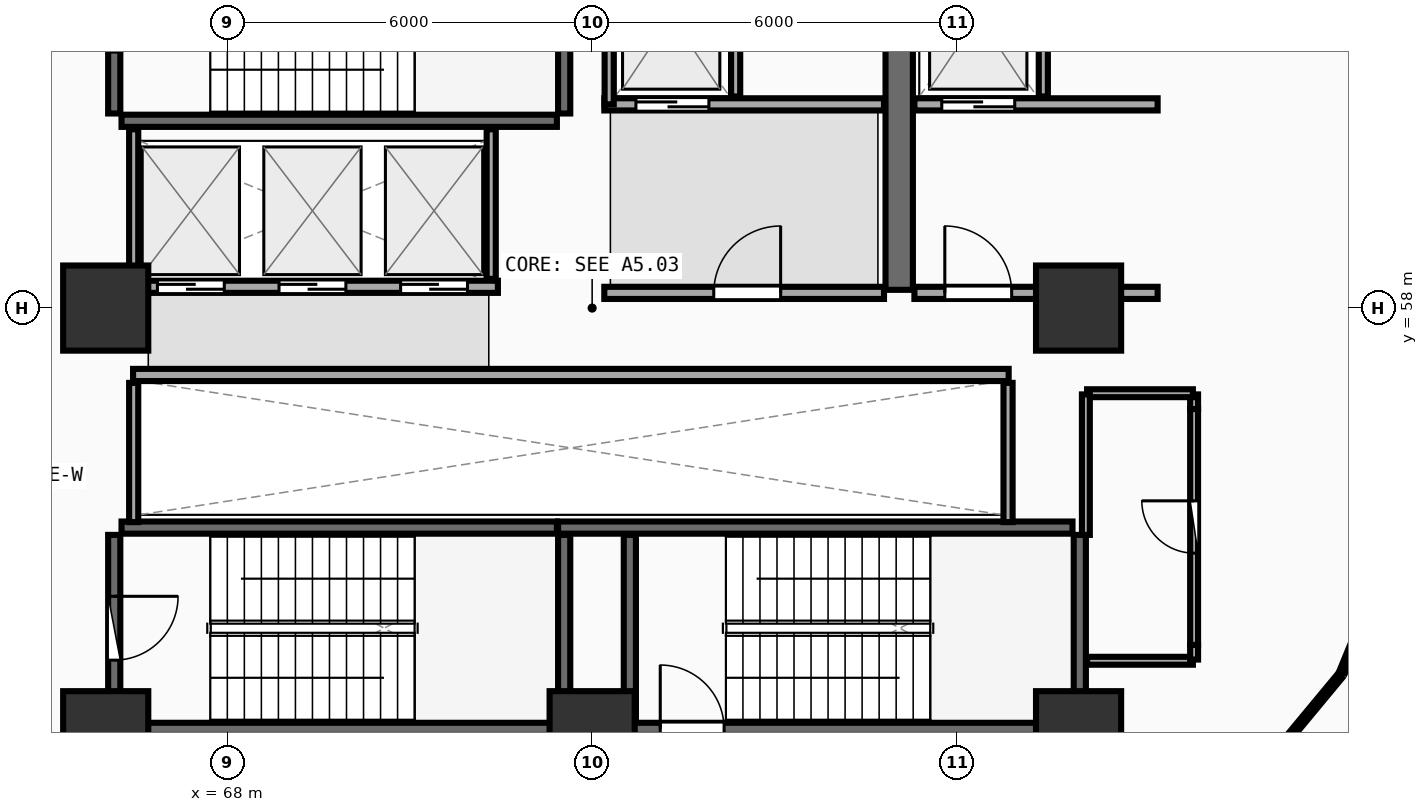
"""IFC4 building model, lengths in metres.
Left out: names, types, materials, properties, quantities, classifications, styles, units other than length and angle.
Written with IfcOpenShell. Run it as: python <this file> out.ifc"""

import sys

from ifc_helpers import new_model, si_unit, direction, frame, frame_2d, origin, origin_2d, place, context, subcontext, project, spatial, rectangle, extrude, element, fill, save


model = new_model("IFC4")
c1 = context("Model", 3, precision=1e-05, world=origin(), true_north=direction((0.0, 1.0)))
c2 = subcontext(c1, "Body", "Model", "MODEL_VIEW")
j1 = project(units=[si_unit("LENGTHUNIT", "METRE"), si_unit("PLANEANGLEUNIT", "RADIAN")], contexts=[c1])
p1 = place(None, origin())
s1 = spatial("IfcSite", under=j1, at=p1, CompositionType="ELEMENT")
p2 = place(p1, origin())
s2 = spatial("IfcBuilding", under=s1, at=p2, CompositionType="ELEMENT")
p3 = place(p2, frame((0.0, 0.0, 4.5)))
s3 = spatial("IfcBuildingStorey", under=s2, at=p3, CompositionType="ELEMENT", Elevation=4.5)
for number, where, z_axis, x_axis in (
    (1, (66.0, 51.0, 0.0), (0.0, 0.0, 1.0), (1.0, 0.0, 0.0)),
    (2, (74.0, 51.0, 0.0), (0.0, 0.0, 1.0), (1.0, 0.0, 0.0)),
    (3, (82.0, 51.0, 0.0), (0.0, 0.0, 1.0), (1.0, 0.0, 0.0)),
    (4, (82.0, 58.0, 0.0), (0.0, 0.0, 1.0), (1.0, 0.0, 0.0)),
    (5, (66.0, 58.0, 0.0), (0.0, 0.0, 1.0), (1.0, 0.0, 0.0)),
):
    element("IfcColumn", number, at=place(p3, frame(where, z_axis=z_axis, x_axis=x_axis)), inside=s3, PredefinedType="PILASTER", context=c2, shape_type="SweptSolid", body=[
        extrude(rectangle(XDim=1.4, YDim=1.4, at=origin_2d()), origin(), (0.0, 0.0, 1.0), 4.5),
    ])
p4 = place(p3, frame((66.26, 61.08, 0.0), z_axis=(0.0, 0.0, 1.0), x_axis=(1.0, 0.0, 0.0)))
e6 = element("IfcWall", 6, at=p4, inside=s3, PredefinedType="SHEAR", context=c2, shape_type="SweptSolid", body=[
    extrude(rectangle(XDim=7.16, YDim=0.2, at=frame_2d((3.58, 0.0))), origin(), (0.0, 0.0, 1.0), 4.2),
])
p5 = place(p3, frame((73.54, 61.2, 0.0), z_axis=(0.0, 0.0, 1.0), x_axis=(0.0, 1.0, 0.0)))
e7 = element("IfcWall", 7, at=p5, inside=s3, PredefinedType="SHEAR", context=c2, shape_type="SweptSolid", body=[
    extrude(rectangle(XDim=3.07, YDim=0.2, at=frame_2d((1.535, 0.0))), origin(), (0.0, 0.0, 1.0), 4.2),
])
p6 = place(p3, frame((66.14, 64.27, 0.0), z_axis=(0.0, 0.0, 1.0), x_axis=(0.0, -1.0, 0.0)))
e8 = element("IfcWall", 8, at=p6, inside=s3, PredefinedType="SHEAR", context=c2, shape_type="SweptSolid", body=[
    extrude(rectangle(XDim=3.07, YDim=0.2, at=frame_2d((1.535, 0.0))), origin(), (0.0, 0.0, 1.0), 4.2),
])
p7 = place(p6, frame((1.01, 0.0, 0.0)))
e9 = element("IfcOpeningElement", 9, at=p7, cuts=e8, PredefinedType="OPENING", context=c2, shape_type="SweptSolid", body=[
    extrude(rectangle(XDim=1.05, YDim=2.1, at=frame_2d((0.525, 1.05))), frame((0.0, 0.11, 0.0), z_axis=(0.0, -1.0, 0.0), x_axis=(1.0, 0.0, 0.0)), (0.0, 0.0, 1.0), 0.22),
])
p8 = place(p3, frame((74.0, 51.08, 0.0), z_axis=(0.0, 0.0, 1.0), x_axis=(1.0, 0.0, 0.0)))
e10 = element("IfcWall", 10, at=p8, inside=s3, PredefinedType="SHEAR", context=c2, shape_type="SweptSolid", body=[
    extrude(rectangle(XDim=7.9, YDim=0.2, at=frame_2d((3.95, 0.0))), origin(), (0.0, 0.0, 1.0), 4.2),
])
p9 = place(p8, frame((1.12, 0.0, 0.0)))
e11 = element("IfcOpeningElement", 11, at=p9, cuts=e10, PredefinedType="OPENING", context=c2, shape_type="SweptSolid", body=[
    extrude(rectangle(XDim=1.05, YDim=2.1, at=frame_2d((0.525, 1.05))), frame((0.0, 0.11, 0.0), z_axis=(0.0, -1.0, 0.0), x_axis=(1.0, 0.0, 0.0)), (0.0, 0.0, 1.0), 0.22),
])
p10 = place(p3, frame((82.02, 51.2, 0.0), z_axis=(0.0, 0.0, 1.0), x_axis=(0.0, 1.0, 0.0)))
e12 = element("IfcWall", 12, at=p10, inside=s3, PredefinedType="SHEAR", context=c2, shape_type="SweptSolid", body=[
    extrude(rectangle(XDim=3.07, YDim=0.2, at=frame_2d((1.535, 0.0))), origin(), (0.0, 0.0, 1.0), 4.2),
])
p11 = place(p3, frame((81.9, 54.39, 0.0), z_axis=(0.0, 0.0, 1.0), x_axis=(-1.0, 0.0, 0.0)))
e13 = element("IfcWall", 13, at=p11, inside=s3, PredefinedType="SHEAR", context=c2, shape_type="SweptSolid", body=[
    extrude(rectangle(XDim=8.46, YDim=0.2, at=frame_2d((4.23, 0.0))), origin(), (0.0, 0.0, 1.0), 4.2),
])
p12 = place(p3, frame((74.62, 54.27, 0.0), z_axis=(0.0, 0.0, 1.0), x_axis=(0.0, -1.0, 0.0)))
e14 = element("IfcWall", 14, at=p12, inside=s3, PredefinedType="SHEAR", context=c2, shape_type="SweptSolid", body=[
    extrude(rectangle(XDim=3.07, YDim=0.2, at=frame_2d((1.535, 0.0))), origin(), (0.0, 0.0, 1.0), 4.2),
])
p13 = place(p3, frame((66.26, 51.08, 0.0), z_axis=(0.0, 0.0, 1.0), x_axis=(1.0, 0.0, 0.0)))
e15 = element("IfcWall", 15, at=p13, inside=s3, PredefinedType="SHEAR", context=c2, shape_type="SweptSolid", body=[
    extrude(rectangle(XDim=7.16, YDim=0.2, at=frame_2d((3.58, 0.0))), origin(), (0.0, 0.0, 1.0), 4.2),
])
p14 = place(p3, frame((73.54, 51.2, 0.0), z_axis=(0.0, 0.0, 1.0), x_axis=(0.0, 1.0, 0.0)))
e16 = element("IfcWall", 16, at=p14, inside=s3, PredefinedType="SHEAR", context=c2, shape_type="SweptSolid", body=[
    extrude(rectangle(XDim=3.07, YDim=0.2, at=frame_2d((1.535, 0.0))), origin(), (0.0, 0.0, 1.0), 4.2),
])
p15 = place(p3, frame((73.42, 54.39, 0.0), z_axis=(0.0, 0.0, 1.0), x_axis=(-1.0, 0.0, 0.0)))
e17 = element("IfcWall", 17, at=p15, inside=s3, PredefinedType="SHEAR", context=c2, shape_type="SweptSolid", body=[
    extrude(rectangle(XDim=7.16, YDim=0.2, at=frame_2d((3.58, 0.0))), origin(), (0.0, 0.0, 1.0), 4.2),
])
p16 = place(p3, frame((66.14, 54.27, 0.0), z_axis=(0.0, 0.0, 1.0), x_axis=(0.0, -1.0, 0.0)))
e18 = element("IfcWall", 18, at=p16, inside=s3, PredefinedType="SHEAR", context=c2, shape_type="SweptSolid", body=[
    extrude(rectangle(XDim=3.07, YDim=0.2, at=frame_2d((1.535, 0.0))), origin(), (0.0, 0.0, 1.0), 4.2),
])
p17 = place(p16, frame((1.01, 0.0, 0.0)))
e19 = element("IfcOpeningElement", 19, at=p17, cuts=e18, PredefinedType="OPENING", context=c2, shape_type="SweptSolid", body=[
    extrude(rectangle(XDim=1.05, YDim=2.1, at=frame_2d((0.525, 1.05))), frame((0.0, 0.11, 0.0), z_axis=(0.0, -1.0, 0.0), x_axis=(1.0, 0.0, 0.0)), (0.0, 0.0, 1.0), 0.22),
])
p18 = place(p3, frame((79.05, 58.3, 0.0), z_axis=(0.0, 0.0, 1.0), x_axis=(0.0, 1.0, 0.0)))
e20 = element("IfcWall", 20, at=p18, inside=s3, PredefinedType="SHEAR", context=c2, shape_type="SweptSolid", body=[
    extrude(rectangle(XDim=6.3, YDim=0.45, at=frame_2d((3.15, 0.0))), origin(), (0.0, 0.0, 1.0), 4.2),
])
p19 = place(p3, frame((74.2, 61.35, 0.0), z_axis=(0.0, 0.0, 1.0), x_axis=(1.0, 0.0, 0.0)))
e21 = element("IfcWall", 21, at=p19, inside=s3, PredefinedType="SOLIDWALL", context=c2, shape_type="SweptSolid", body=[
    extrude(rectangle(XDim=4.6, YDim=0.2, at=frame_2d((2.3, 0.0))), origin(), (0.0, 0.0, 1.0), 4.19),
])
p20 = place(p19, frame((0.52, 0.0, 0.0)))
e22 = element("IfcOpeningElement", 22, at=p20, cuts=e21, PredefinedType="OPENING", context=c2, shape_type="SweptSolid", body=[
    extrude(rectangle(XDim=1.2, YDim=2.15, at=frame_2d((0.6, 1.075))), frame((0.0, 0.11, 0.0), z_axis=(0.0, -1.0, 0.0), x_axis=(1.0, 0.0, 0.0)), (0.0, 0.0, 1.0), 0.22),
])
p21 = place(p3, frame((74.28, 61.35, 0.0), z_axis=(0.0, 0.0, 1.0), x_axis=(0.0, 1.0, 0.0)))
e23 = element("IfcWall", 23, at=p21, inside=s3, PredefinedType="PARTITIONING", context=c2, shape_type="SweptSolid", body=[
    extrude(rectangle(XDim=2.97, YDim=0.15, at=frame_2d((1.485, 0.0))), origin(), (0.0, 0.0, 1.0), 4.19),
])
p22 = place(p3, frame((76.36, 61.48, 0.0), z_axis=(0.0, 0.0, 1.0), x_axis=(0.0, 1.0, 0.0)))
e24 = element("IfcWall", 24, at=p22, inside=s3, PredefinedType="PARTITIONING", context=c2, shape_type="SweptSolid", body=[
    extrude(rectangle(XDim=2.84, YDim=0.15, at=frame_2d((1.42, 0.0))), origin(), (0.0, 0.0, 1.0), 4.19),
])
p23 = place(p3, frame((79.3, 61.35, 0.0), z_axis=(0.0, 0.0, 1.0), x_axis=(1.0, 0.0, 0.0)))
e25 = element("IfcWall", 25, at=p23, inside=s3, PredefinedType="SOLIDWALL", context=c2, shape_type="SweptSolid", body=[
    extrude(rectangle(XDim=4.0, YDim=0.2, at=frame_2d((2.0, 0.0))), origin(), (0.0, 0.0, 1.0), 3.485),
])
p24 = place(p23, frame((0.45, 0.0, 0.0)))
e26 = element("IfcOpeningElement", 26, at=p24, cuts=e25, PredefinedType="OPENING", context=c2, shape_type="SweptSolid", body=[
    extrude(rectangle(XDim=1.2, YDim=2.15, at=frame_2d((0.6, 1.075))), frame((0.0, 0.11, 0.0), z_axis=(0.0, -1.0, 0.0), x_axis=(1.0, 0.0, 0.0)), (0.0, 0.0, 1.0), 0.22),
])
p25 = place(p3, frame((81.42, 61.48, 0.0), z_axis=(0.0, 0.0, 1.0), x_axis=(0.0, 1.0, 0.0)))
e27 = element("IfcWall", 27, at=p25, inside=s3, PredefinedType="PARTITIONING", context=c2, shape_type="SweptSolid", body=[
    extrude(rectangle(XDim=2.84, YDim=0.15, at=frame_2d((1.42, 0.0))), origin(), (0.0, 0.0, 1.0), 4.19),
])
p26 = place(p3, frame((74.2, 58.25, 0.0), z_axis=(0.0, 0.0, 1.0), x_axis=(1.0, 0.0, 0.0)))
e28 = element("IfcWall", 28, at=p26, inside=s3, PredefinedType="SOLIDWALL", context=c2, shape_type="SweptSolid", body=[
    extrude(rectangle(XDim=4.6, YDim=0.2, at=frame_2d((2.3, 0.0))), origin(), (0.0, 0.0, 1.0), 4.19),
])
p27 = place(p26, frame((1.8, 0.0, 0.0)))
e29 = element("IfcOpeningElement", 29, at=p27, cuts=e28, PredefinedType="OPENING", context=c2, shape_type="SweptSolid", body=[
    extrude(rectangle(XDim=1.1, YDim=2.1, at=frame_2d((0.55, 1.05))), frame((0.0, 0.11, 0.0), z_axis=(0.0, -1.0, 0.0), x_axis=(1.0, 0.0, 0.0)), (0.0, 0.0, 1.0), 0.22),
])
p28 = place(p3, frame((79.3, 58.25, 0.0), z_axis=(0.0, 0.0, 1.0), x_axis=(1.0, 0.0, 0.0)))
e30 = element("IfcWall", 30, at=p28, inside=s3, PredefinedType="SOLIDWALL", context=c2, shape_type="SweptSolid", body=[
    extrude(rectangle(XDim=4.0, YDim=0.2, at=frame_2d((2.0, 0.0))), origin(), (0.0, 0.0, 1.0), 3.485),
])
p29 = place(p28, frame((0.5, 0.0, 0.0)))
e31 = element("IfcOpeningElement", 31, at=p29, cuts=e30, PredefinedType="OPENING", context=c2, shape_type="SweptSolid", body=[
    extrude(rectangle(XDim=1.1, YDim=2.1, at=frame_2d((0.55, 1.05))), frame((0.0, 0.11, 0.0), z_axis=(0.0, -1.0, 0.0), x_axis=(1.0, 0.0, 0.0)), (0.0, 0.0, 1.0), 0.22),
])
p30 = place(p3, frame((66.45, 58.35, 0.0), z_axis=(0.0, 0.0, 1.0), x_axis=(1.0, 0.0, 0.0)))
e32 = element("IfcWall", 32, at=p30, inside=s3, PredefinedType="SOLIDWALL", context=c2, shape_type="SweptSolid", body=[
    extrude(rectangle(XDim=6.0, YDim=0.2, at=frame_2d((3.0, 0.0))), origin(), (0.0, 0.0, 1.0), 4.19),
])
p31 = place(p30, frame((0.4, 0.0, 0.0)))
e33 = element("IfcOpeningElement", 33, at=p31, cuts=e32, PredefinedType="OPENING", context=c2, shape_type="SweptSolid", body=[
    extrude(rectangle(XDim=1.1, YDim=2.1, at=frame_2d((0.55, 1.05))), frame((0.0, 0.11, 0.0), z_axis=(0.0, -1.0, 0.0), x_axis=(1.0, 0.0, 0.0)), (0.0, 0.0, 1.0), 0.22),
])
p32 = place(p30, frame((2.4, 0.0, 0.0)))
e34 = element("IfcOpeningElement", 34, at=p32, cuts=e32, PredefinedType="OPENING", context=c2, shape_type="SweptSolid", body=[
    extrude(rectangle(XDim=1.1, YDim=2.1, at=frame_2d((0.55, 1.05))), frame((0.0, 0.11, 0.0), z_axis=(0.0, -1.0, 0.0), x_axis=(1.0, 0.0, 0.0)), (0.0, 0.0, 1.0), 0.22),
])
p33 = place(p30, frame((4.4, 0.0, 0.0)))
e35 = element("IfcOpeningElement", 35, at=p33, cuts=e32, PredefinedType="OPENING", context=c2, shape_type="SweptSolid", body=[
    extrude(rectangle(XDim=1.1, YDim=2.1, at=frame_2d((0.55, 1.05))), frame((0.0, 0.11, 0.0), z_axis=(0.0, -1.0, 0.0), x_axis=(1.0, 0.0, 0.0)), (0.0, 0.0, 1.0), 0.22),
])
for number, where, z_axis, x_axis in (
    (36, (66.46, 58.48, 0.0), (0.0, 0.0, 1.0), (0.0, 1.0, 0.0)),
    (37, (72.34, 58.48, 0.0), (0.0, 0.0, 1.0), (0.0, 1.0, 0.0)),
):
    element("IfcWall", number, at=place(p3, frame(where, z_axis=z_axis, x_axis=x_axis)), inside=s3, PredefinedType="PARTITIONING", context=c2, shape_type="SweptSolid", body=[
        extrude(rectangle(XDim=2.46, YDim=0.15, at=frame_2d((1.23, 0.0))), origin(), (0.0, 0.0, 1.0), 4.19),
    ])
p34 = place(p3, frame((66.45, 56.9, 0.0), z_axis=(0.0, 0.0, 1.0), x_axis=(1.0, 0.0, 0.0)))
e38 = element("IfcWall", 38, at=p34, inside=s3, PredefinedType="SOLIDWALL", context=c2, shape_type="SweptSolid", body=[
    extrude(rectangle(XDim=14.4, YDim=0.2, at=frame_2d((7.2, 0.0))), origin(), (0.0, 0.0, 1.0), 4.19),
])
for number, where, z_axis, x_axis in (
    (39, (66.46, 54.48, 0.0), (0.0, 0.0, 1.0), (0.0, 1.0, 0.0)),
    (40, (80.84, 54.48, 0.0), (0.0, 0.0, 1.0), (0.0, 1.0, 0.0)),
):
    element("IfcWall", number, at=place(p3, frame(where, z_axis=z_axis, x_axis=x_axis)), inside=s3, PredefinedType="PARTITIONING", context=c2, shape_type="SweptSolid", body=[
        extrude(rectangle(XDim=2.29, YDim=0.15, at=frame_2d((1.145, 0.0))), origin(), (0.0, 0.0, 1.0), 4.19),
    ])
p35 = place(p3, frame((83.9, 52.46, 0.0), z_axis=(0.0, 0.0, 1.0), x_axis=(0.0, 1.0, 0.0)))
e41 = element("IfcWall", 41, at=p35, inside=s3, PredefinedType="PLUMBINGWALL", context=c2, shape_type="SweptSolid", body=[
    extrude(rectangle(XDim=3.88, YDim=0.13, at=frame_2d((1.94, 0.0))), origin(), (0.0, 0.0, 1.0), 4.19),
])
p36 = place(p35, frame((1.51, 0.0, 0.0)))
e42 = element("IfcOpeningElement", 42, at=p36, cuts=e41, PredefinedType="OPENING", context=c2, shape_type="SweptSolid", body=[
    extrude(rectangle(XDim=0.86, YDim=2.05, at=frame_2d((0.43, 1.025))), frame((0.0, 0.075, 0.0), z_axis=(0.0, -1.0, 0.0), x_axis=(1.0, 0.0, 0.0)), (0.0, 0.0, 1.0), 0.15),
])
p37 = place(p3, frame((82.14, 52.2, 0.0), z_axis=(0.0, 0.0, 1.0), x_axis=(1.0, 0.0, 0.0)))
e43 = element("IfcWall", 43, at=p37, inside=s3, PredefinedType="PLUMBINGWALL", context=c2, shape_type="SweptSolid", body=[
    extrude(rectangle(XDim=1.74, YDim=0.13, at=frame_2d((0.87, 0.0))), origin(), (0.0, 0.0, 1.0), 3.485),
])
for number, where, z_axis, x_axis in (
    (44, (83.9, 52.22, 0.0), (0.0, 0.0, 1.0), (0.0, 1.0, 0.0)),
    (45, (83.9, 56.34, 0.0), (0.0, 0.0, 1.0), (0.0, 1.0, 0.0)),
):
    element("IfcWall", number, at=place(p3, frame(where, z_axis=z_axis, x_axis=x_axis)), inside=s3, PredefinedType="PLUMBINGWALL", context=c2, shape_type="SweptSolid", body=[
        extrude(rectangle(XDim=0.24, YDim=0.13, at=frame_2d((0.12, 0.0))), origin(), (0.0, 0.0, 1.0), 4.19),
    ])
p38 = place(p3, frame((83.88, 56.6, 0.0), z_axis=(0.0, 0.0, 1.0), x_axis=(-1.0, 0.0, 0.0)))
e46 = element("IfcWall", 46, at=p38, inside=s3, PredefinedType="PLUMBINGWALL", context=c2, shape_type="SweptSolid", body=[
    extrude(rectangle(XDim=1.74, YDim=0.13, at=frame_2d((0.87, 0.0))), origin(), (0.0, 0.0, 1.0), 3.485),
])
p39 = place(p3, frame((82.12, 56.58, 0.0), z_axis=(0.0, 0.0, 1.0), x_axis=(0.0, -1.0, 0.0)))
e47 = element("IfcWall", 47, at=p39, inside=s3, PredefinedType="PLUMBINGWALL", context=c2, shape_type="SweptSolid", body=[
    extrude(rectangle(XDim=2.31, YDim=0.13, at=frame_2d((1.155, 0.0))), origin(), (0.0, 0.0, 1.0), 3.485),
])
p40 = place(p3, frame((83.939, 49.107, 0.0), z_axis=(0.0, 0.0, 1.0), x_axis=(0.638393231466, 0.769710388405, 0.0)))
e48 = element("IfcWall", 48, at=p40, inside=s3, PredefinedType="PARTITIONING", context=c2, shape_type="SweptSolid", body=[
    extrude(rectangle(XDim=3.69, YDim=0.1, at=frame_2d((1.845, 0.0))), origin(), (0.0, 0.0, 1.0), 3.585),
])
p41 = place(p3, frame((86.336, 52.015, 0.0), z_axis=(0.0, 0.0, 1.0), x_axis=(0.379262523909, 0.925289110472, 0.0)))
e49 = element("IfcWall", 49, at=p41, inside=s3, PredefinedType="PARTITIONING", context=c2, shape_type="SweptSolid", body=[
    extrude(rectangle(XDim=3.593, YDim=0.1, at=frame_2d((1.796, 0.0))), origin(), (0.0, 0.0, 1.0), 4.19),
])
p42 = place(p9, origin())
e50 = element("IfcDoor", 50, at=p42, inside=s3, OperationType="SINGLE_SWING_LEFT", PredefinedType="DOOR", context=c2, shape_type="SweptSolid", body=[
    extrude(rectangle(XDim=1.05, YDim=2.1, at=frame_2d((0.525, 1.05))), frame((0.0, 0.025, 0.0), z_axis=(0.0, -1.0, 0.0), x_axis=(1.0, 0.0, 0.0)), (0.0, 0.0, 1.0), 0.05),
])
fill(e11, e50)
p43 = place(p17, origin())
e51 = element("IfcDoor", 51, at=p43, inside=s3, OperationType="SINGLE_SWING_LEFT", PredefinedType="DOOR", context=c2, shape_type="SweptSolid", body=[
    extrude(rectangle(XDim=1.05, YDim=2.1, at=frame_2d((0.525, 1.05))), frame((0.0, 0.025, 0.0), z_axis=(0.0, -1.0, 0.0), x_axis=(1.0, 0.0, 0.0)), (0.0, 0.0, 1.0), 0.05),
])
fill(e19, e51)
p44 = place(p20, origin())
e52 = element("IfcDoor", 52, at=p44, inside=s3, OperationType="DOUBLE_DOOR_SLIDING", PredefinedType="DOOR", context=c2, shape_type="SweptSolid", body=[
    extrude(rectangle(XDim=1.2, YDim=2.15, at=frame_2d((0.6, 1.075))), frame((0.0, 0.025, 0.0), z_axis=(0.0, -1.0, 0.0), x_axis=(1.0, 0.0, 0.0)), (0.0, 0.0, 1.0), 0.05),
])
fill(e22, e52)
p45 = place(p24, origin())
e53 = element("IfcDoor", 53, at=p45, inside=s3, OperationType="DOUBLE_DOOR_SLIDING", PredefinedType="DOOR", context=c2, shape_type="SweptSolid", body=[
    extrude(rectangle(XDim=1.2, YDim=2.15, at=frame_2d((0.6, 1.075))), frame((0.0, 0.025, 0.0), z_axis=(0.0, -1.0, 0.0), x_axis=(1.0, 0.0, 0.0)), (0.0, 0.0, 1.0), 0.05),
])
fill(e26, e53)
p46 = place(p27, frame((1.1, 0.0, 0.0), z_axis=(0.0, 0.0, 1.0), x_axis=(-1.0, 0.0, 0.0)))
e54 = element("IfcDoor", 54, at=p46, inside=s3, OperationType="SINGLE_SWING_LEFT", PredefinedType="DOOR", context=c2, shape_type="SweptSolid", body=[
    extrude(rectangle(XDim=1.1, YDim=2.1, at=frame_2d((0.55, 1.05))), frame((0.0, 0.025, 0.0), z_axis=(0.0, -1.0, 0.0), x_axis=(1.0, 0.0, 0.0)), (0.0, 0.0, 1.0), 0.05),
])
fill(e29, e54)
p47 = place(p29, frame((1.1, 0.0, 0.0), z_axis=(0.0, 0.0, 1.0), x_axis=(-1.0, 0.0, 0.0)))
e55 = element("IfcDoor", 55, at=p47, inside=s3, OperationType="SINGLE_SWING_RIGHT", PredefinedType="DOOR", context=c2, shape_type="SweptSolid", body=[
    extrude(rectangle(XDim=1.1, YDim=2.1, at=frame_2d((0.55, 1.05))), frame((0.0, 0.025, 0.0), z_axis=(0.0, -1.0, 0.0), x_axis=(1.0, 0.0, 0.0)), (0.0, 0.0, 1.0), 0.05),
])
fill(e31, e55)
p48 = place(p31, origin())
e56 = element("IfcDoor", 56, at=p48, inside=s3, OperationType="DOUBLE_DOOR_SLIDING", PredefinedType="DOOR", context=c2, shape_type="SweptSolid", body=[
    extrude(rectangle(XDim=1.1, YDim=2.1, at=frame_2d((0.55, 1.05))), frame((0.0, 0.025, 0.0), z_axis=(0.0, -1.0, 0.0), x_axis=(1.0, 0.0, 0.0)), (0.0, 0.0, 1.0), 0.05),
])
fill(e33, e56)
p49 = place(p32, origin())
e57 = element("IfcDoor", 57, at=p49, inside=s3, OperationType="DOUBLE_DOOR_SLIDING", PredefinedType="DOOR", context=c2, shape_type="SweptSolid", body=[
    extrude(rectangle(XDim=1.1, YDim=2.1, at=frame_2d((0.55, 1.05))), frame((0.0, 0.025, 0.0), z_axis=(0.0, -1.0, 0.0), x_axis=(1.0, 0.0, 0.0)), (0.0, 0.0, 1.0), 0.05),
])
fill(e34, e57)
p50 = place(p33, origin())
e58 = element("IfcDoor", 58, at=p50, inside=s3, OperationType="DOUBLE_DOOR_SLIDING", PredefinedType="DOOR", context=c2, shape_type="SweptSolid", body=[
    extrude(rectangle(XDim=1.1, YDim=2.1, at=frame_2d((0.55, 1.05))), frame((0.0, 0.025, 0.0), z_axis=(0.0, -1.0, 0.0), x_axis=(1.0, 0.0, 0.0)), (0.0, 0.0, 1.0), 0.05),
])
fill(e35, e58)
p51 = place(p36, origin())
e59 = element("IfcDoor", 59, at=p51, inside=s3, OperationType="SINGLE_SWING_RIGHT", PredefinedType="DOOR", context=c2, shape_type="SweptSolid", body=[
    extrude(rectangle(XDim=0.86, YDim=2.05, at=frame_2d((0.43, 1.025))), frame((0.0, 0.025, 0.0), z_axis=(0.0, -1.0, 0.0), x_axis=(1.0, 0.0, 0.0)), (0.0, 0.0, 1.0), 0.05),
])
fill(e42, e59)
save(model, sys.argv[1])
